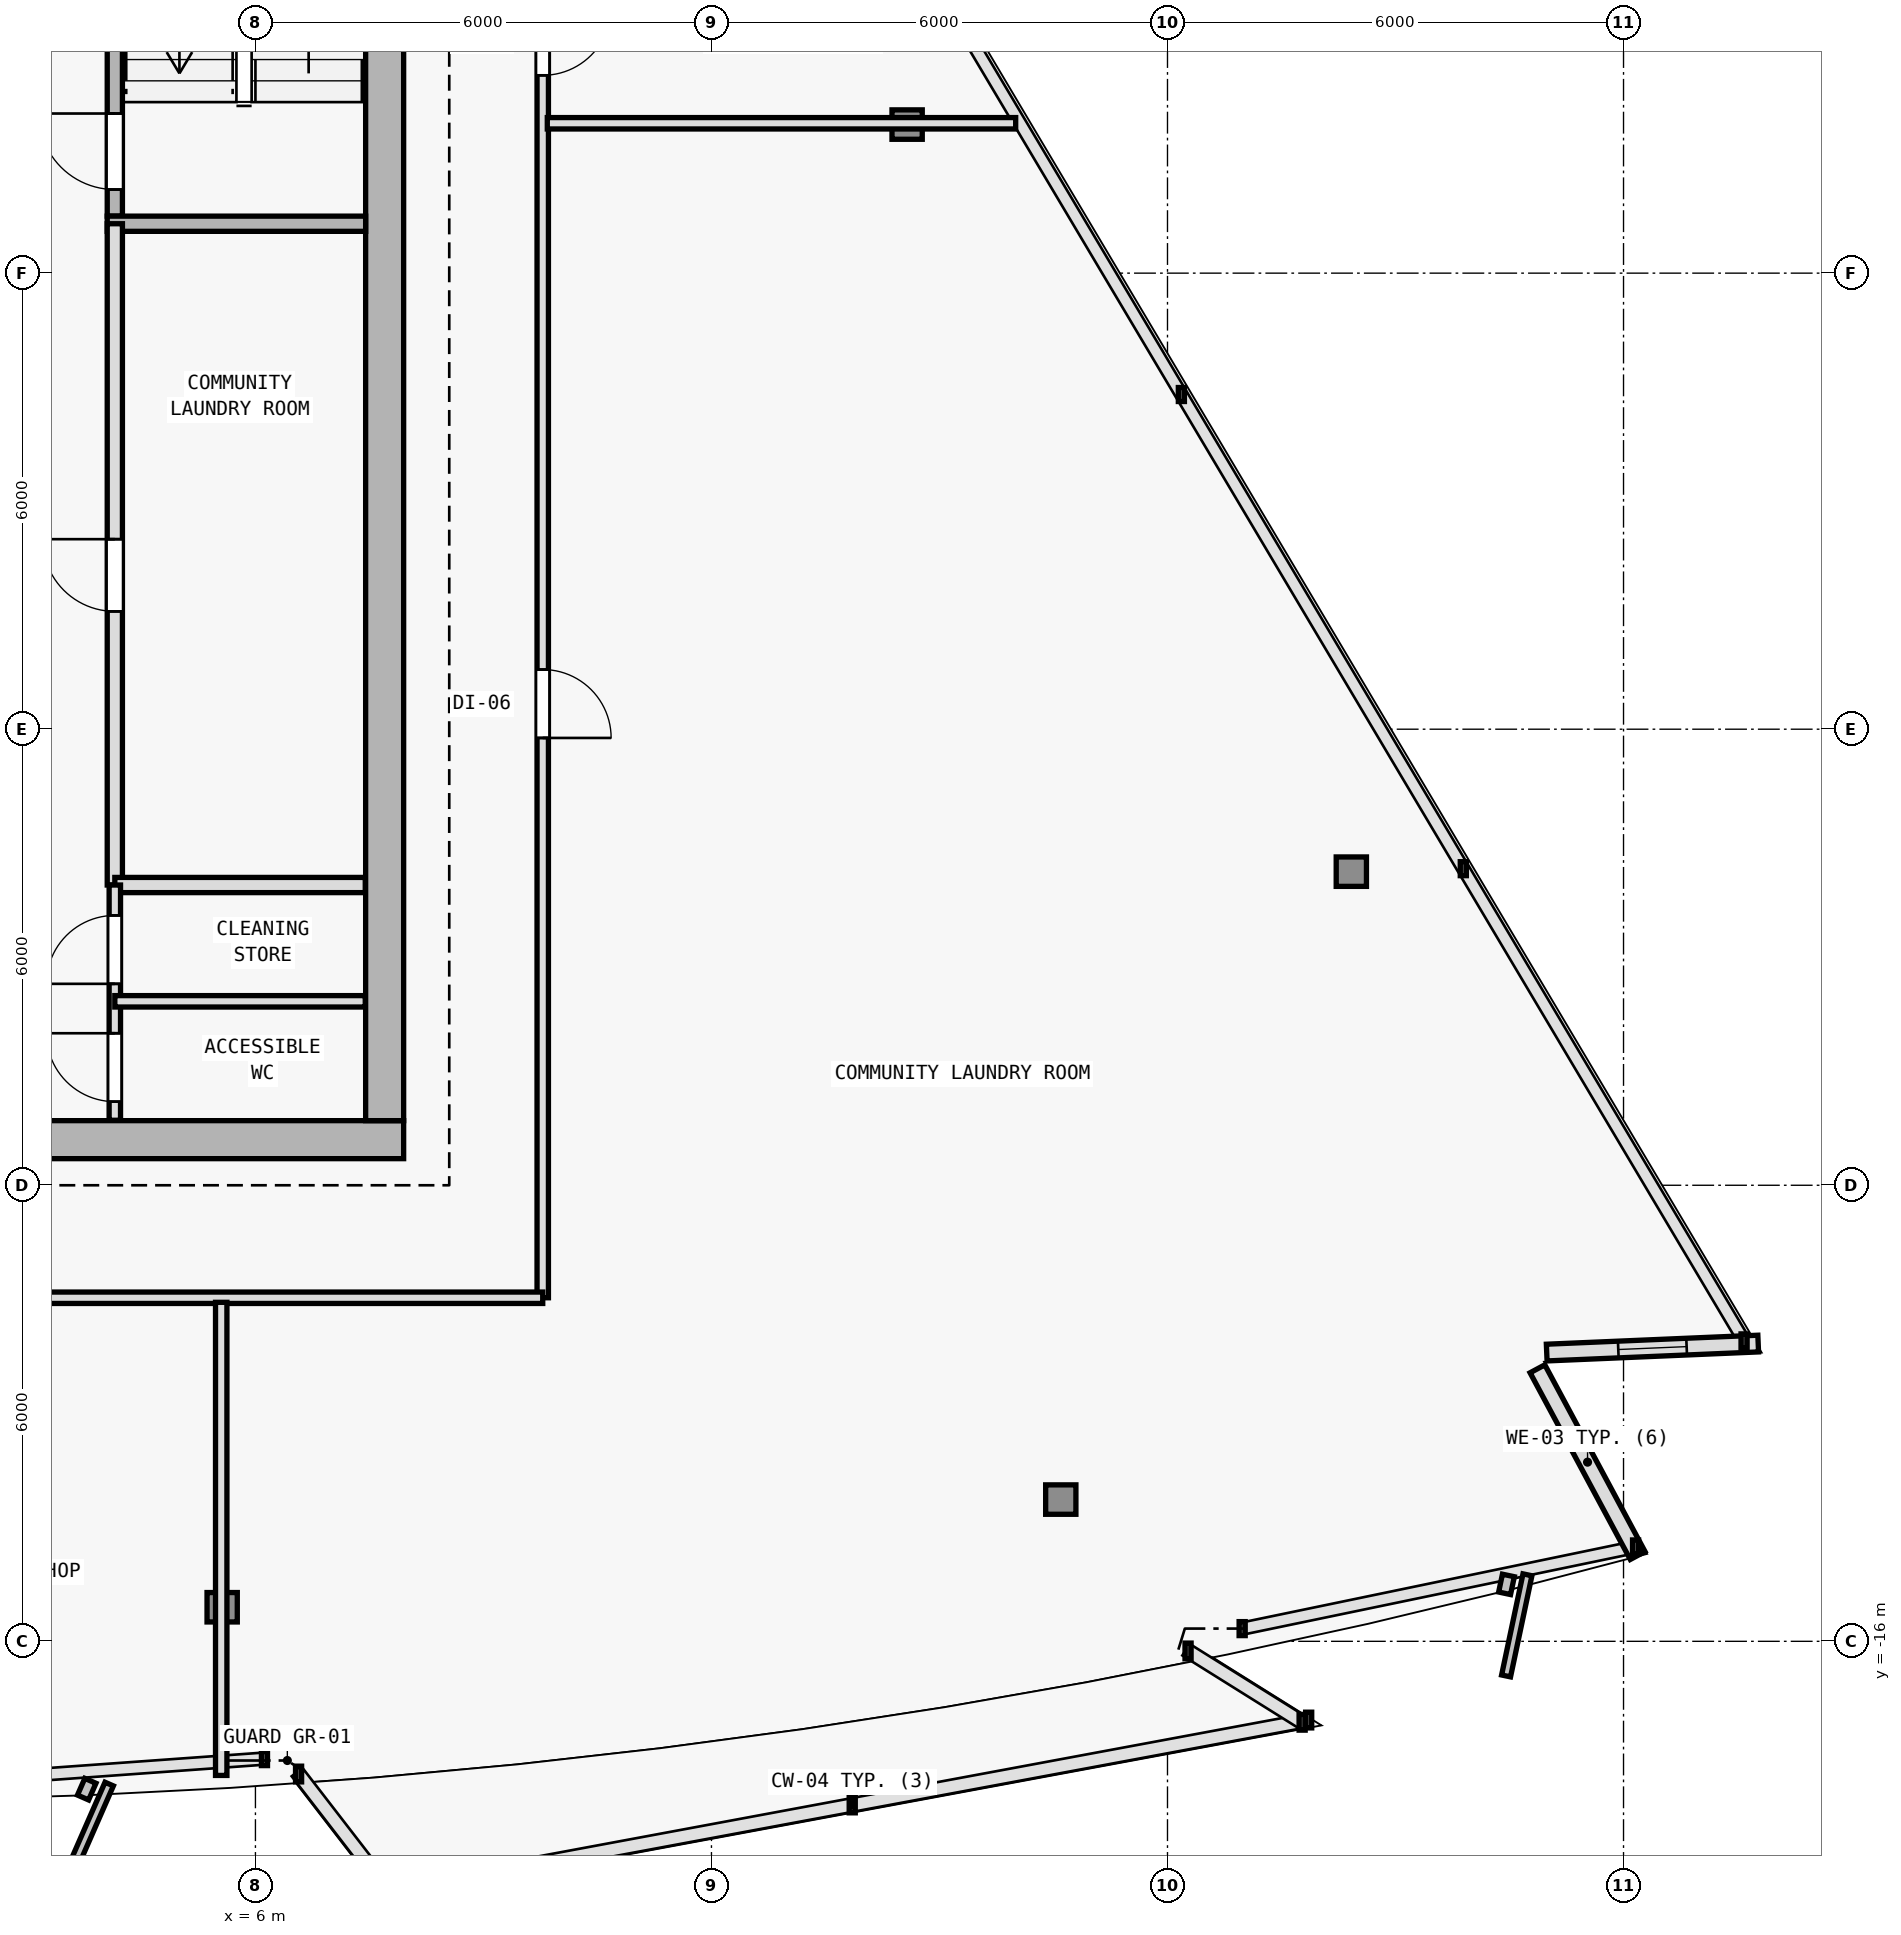
"""IFC4 building model, lengths in metres.
Left out: names, types, materials, properties, quantities, classifications, styles, units other than length and angle.
Written with IfcOpenShell. Run it as: python <this file> out.ifc"""

import sys

from ifc_helpers import new_model, si_unit, direction, frame, frame_2d, origin, origin_2d, place, context, subcontext, project, spatial, rectangle, i_section, extrude, element, fill, save


model = new_model("IFC4")
c1 = context("Model", 3, precision=1e-05, world=origin(), true_north=direction((0.0, 1.0)))
c2 = subcontext(c1, "Body", "Model", "MODEL_VIEW")
j1 = project(units=[si_unit("LENGTHUNIT", "METRE"), si_unit("PLANEANGLEUNIT", "RADIAN")], contexts=[c1])
p1 = place(None, origin())
s1 = spatial("IfcSite", under=j1, at=p1, CompositionType="ELEMENT")
p2 = place(p1, origin())
s2 = spatial("IfcBuilding", under=s1, at=p2, CompositionType="ELEMENT")
p3 = place(p2, frame((0.0, 0.0, 216.3)))
s3 = spatial("IfcBuildingStorey", under=s2, at=p3, CompositionType="ELEMENT", Elevation=216.3)
for number, where, z_axis, x_axis in (
    (1, (7.7, -9.4, 0.0), (0.0, 0.0, 1.0), (1.0, 0.0, 0.0)),
    (2, (7.7, 0.4, 0.0), (0.0, 0.0, 1.0), (1.0, 0.0, 0.0)),
):
    element("IfcColumn", number, at=place(p3, frame(where, z_axis=z_axis, x_axis=x_axis)), inside=s3, PredefinedType="COLUMN", context=c2, shape_type="SweptSolid", body=[
        extrude(i_section(OverallWidth=0.398, OverallDepth=0.387, WebThickness=0.013, FlangeThickness=0.022, FilletRadius=0.015, at=origin_2d()), origin(), (0.0, 0.0, 1.0), 3.6),
    ])
p4 = place(p3, frame((5.562, -15.552, 0.005), z_axis=(-0.00693381708, 0.03528089279, 0.999353381334), x_axis=(-0.981229659911, -0.192842823335, 0.0)))
e3 = element("IfcColumn", 3, at=p4, inside=s3, PredefinedType="COLUMN", context=c2, shape_type="SweptSolid", body=[
    extrude(i_section(OverallWidth=0.398, OverallDepth=0.387, WebThickness=0.013, FlangeThickness=0.022, FilletRadius=0.015, at=origin_2d()), origin(), (0.0, 0.0, 1.0), 3.592),
])
p5 = place(p3, frame((16.596, -14.135, 0.005), z_axis=(-0.020594893987, 0.033509183946, 0.999226193078), x_axis=(-0.851954850327, -0.523615252838, 0.0)))
e4 = element("IfcColumn", 4, at=p5, inside=s3, PredefinedType="COLUMN", context=c2, shape_type="SweptSolid", body=[
    extrude(i_section(OverallWidth=0.398, OverallDepth=0.387, WebThickness=0.013, FlangeThickness=0.022, FilletRadius=0.015, at=origin_2d()), origin(), (0.0, 0.0, 1.0), 3.592),
])
p6 = place(p3, frame((20.419, -5.874, 0.005), z_axis=(-0.026105663043, 0.021618752208, 0.999425396871), x_axis=(-0.637813971185, -0.770190455771, 0.0)))
e5 = element("IfcColumn", 5, at=p6, inside=s3, PredefinedType="COLUMN", context=c2, shape_type="SweptSolid", body=[
    extrude(i_section(OverallWidth=0.398, OverallDepth=0.387, WebThickness=0.013, FlangeThickness=0.022, FilletRadius=0.015, at=origin_2d()), origin(), (0.0, 0.0, 1.0), 3.591),
])
p7 = place(p3, frame((14.574, 3.955, 0.005), z_axis=(-0.018906041, 0.009521027842, 0.999775930718), x_axis=(-0.449781931574, -0.893138406984, 0.0)))
e6 = element("IfcColumn", 6, at=p7, inside=s3, PredefinedType="COLUMN", context=c2, shape_type="SweptSolid", body=[
    extrude(i_section(OverallWidth=0.398, OverallDepth=0.387, WebThickness=0.013, FlangeThickness=0.022, FilletRadius=0.015, at=origin_2d()), origin(), (0.0, 0.0, 1.0), 3.59),
])
p8 = place(p3, frame((22.868, -12.415, 0.0), z_axis=(0.0, 0.0, 1.0), x_axis=(0.472845900162, -0.881145138272, 0.0)))
e7 = element("IfcWall", 7, at=p8, inside=s3, PredefinedType="SOLIDWALL", context=c2, shape_type="SweptSolid", body=[
    extrude(rectangle(XDim=2.788, YDim=0.22, at=frame_2d((1.394, 0.0))), origin(), (0.0, 0.0, 1.0), 3.35),
])
p9 = place(p3, frame((25.772, -12.083, 0.0), z_axis=(0.0, 0.0, 1.0), x_axis=(-0.999095761456, -0.042516578425, 0.0)))
e8 = element("IfcWall", 8, at=p9, inside=s3, PredefinedType="SOLIDWALL", context=c2, shape_type="SweptSolid", body=[
    extrude(rectangle(XDim=2.785, YDim=0.22, at=frame_2d((1.393, 0.0))), origin(), (0.0, 0.0, 1.0), 3.35),
])
p10 = place(p9, frame((0.942, 0.0, 0.62)))
e9 = element("IfcOpeningElement", 9, at=p10, cuts=e8, PredefinedType="OPENING", context=c2, shape_type="SweptSolid", body=[
    extrude(rectangle(XDim=0.9, YDim=1.6, at=frame_2d((0.45, 0.8))), frame((0.0, 0.12, 0.0), z_axis=(0.0, -1.0, 0.0), x_axis=(1.0, 0.0, 0.0)), (0.0, 0.0, 1.0), 0.24),
])
p11 = place(p3, frame((-7.95, -9.4, 0.0), z_axis=(0.0, 0.0, 1.0), x_axis=(1.0, 0.0, 0.0)))
e10 = element("IfcWall", 10, at=p11, inside=s3, PredefinedType="SHEAR", context=c2, shape_type="SweptSolid", body=[
    extrude(rectangle(XDim=15.9, YDim=0.5, at=frame_2d((7.95, 0.0))), origin(), (0.0, 0.0, 1.0), 3.35),
])
p12 = place(p11, frame((9.6, 0.0, 0.0)))
e11 = element("IfcOpeningElement", 11, at=p12, cuts=e10, PredefinedType="OPENING", context=c2, shape_type="SweptSolid", body=[
    extrude(rectangle(XDim=1.5, YDim=2.2, at=frame_2d((0.75, 1.1))), frame((0.0, 0.26, 0.0), z_axis=(0.0, -1.0, 0.0), x_axis=(1.0, 0.0, 0.0)), (0.0, 0.0, 1.0), 0.52),
])
p13 = place(p3, frame((7.7, 9.95, 0.0), z_axis=(0.0, 0.0, 1.0), x_axis=(0.0, -1.0, 0.0)))
e12 = element("IfcWall", 12, at=p13, inside=s3, PredefinedType="SHEAR", context=c2, shape_type="SweptSolid", body=[
    extrude(rectangle(XDim=19.1, YDim=0.5, at=frame_2d((9.55, 0.0))), origin(), (0.0, 0.0, 1.0), 3.35),
])
p14 = place(p3, frame((4.15, 2.75, 0.0), z_axis=(0.0, 0.0, 1.0), x_axis=(0.0, 1.0, 0.0)))
e13 = element("IfcWall", 13, at=p14, inside=s3, PredefinedType="SOLIDWALL", context=c2, shape_type="SweptSolid", body=[
    extrude(rectangle(XDim=7.2, YDim=0.2, at=frame_2d((3.6, 0.0))), origin(), (0.0, 0.0, 1.0), 3.35),
])
p15 = place(p14, frame((0.35, 0.0, 0.0)))
e14 = element("IfcOpeningElement", 14, at=p15, cuts=e13, PredefinedType="OPENING", context=c2, shape_type="SweptSolid", body=[
    extrude(rectangle(XDim=1.0, YDim=2.15, at=frame_2d((0.5, 1.075))), frame((0.0, 0.11, 0.0), z_axis=(0.0, -1.0, 0.0), x_axis=(1.0, 0.0, 0.0)), (0.0, 0.0, 1.0), 0.22),
])
p16 = place(p3, frame((4.05, 2.65, 0.0), z_axis=(0.0, 0.0, 1.0), x_axis=(1.0, 0.0, 0.0)))
e15 = element("IfcWall", 15, at=p16, inside=s3, PredefinedType="SOLIDWALL", context=c2, shape_type="SweptSolid", body=[
    extrude(rectangle(XDim=3.4, YDim=0.2, at=frame_2d((1.7, 0.0))), origin(), (0.0, 0.0, 1.0), 3.35),
])
p17 = place(p3, frame((4.15, -6.05, 0.0), z_axis=(0.0, 0.0, 1.0), x_axis=(0.0, 1.0, 0.0)))
e16 = element("IfcWall", 16, at=p17, inside=s3, PredefinedType="SOLIDWALL", context=c2, shape_type="SweptSolid", body=[
    extrude(rectangle(XDim=8.7, YDim=0.2, at=frame_2d((4.35, 0.0))), origin(), (0.0, 0.0, 1.0), 3.35),
])
p18 = place(p17, frame((3.6, 0.0, 0.0)))
e17 = element("IfcOpeningElement", 17, at=p18, cuts=e16, PredefinedType="OPENING", context=c2, shape_type="SweptSolid", body=[
    extrude(rectangle(XDim=0.95, YDim=2.1, at=frame_2d((0.475, 1.05))), frame((0.0, 0.11, 0.0), z_axis=(0.0, -1.0, 0.0), x_axis=(1.0, 0.0, 0.0)), (0.0, 0.0, 1.0), 0.22),
])
p19 = place(p3, frame((4.15, -6.05, 0.0), z_axis=(0.0, 0.0, 1.0), x_axis=(1.0, 0.0, 0.0)))
e18 = element("IfcWall", 18, at=p19, inside=s3, PredefinedType="SOLIDWALL", context=c2, shape_type="SweptSolid", body=[
    extrude(rectangle(XDim=3.295, YDim=0.2, at=frame_2d((1.647, 0.0))), origin(), (0.0, 0.0, 1.0), 3.35),
])
p20 = place(p3, frame((4.15, -9.145, 0.0), z_axis=(0.0, 0.0, 1.0), x_axis=(0.0, 1.0, 0.0)))
e19 = element("IfcWall", 19, at=p20, inside=s3, PredefinedType="PARTITIONING", context=c2, shape_type="SweptSolid", body=[
    extrude(rectangle(XDim=3.095, YDim=0.15, at=frame_2d((1.547, 0.0))), origin(), (0.0, 0.0, 1.0), 3.35),
])
p21 = place(p20, frame((0.245, 0.0, 0.0)))
e20 = element("IfcOpeningElement", 20, at=p21, cuts=e19, PredefinedType="OPENING", context=c2, shape_type="SweptSolid", body=[
    extrude(rectangle(XDim=0.9, YDim=2.1, at=frame_2d((0.45, 1.05))), frame((0.0, 0.085, 0.0), z_axis=(0.0, -1.0, 0.0), x_axis=(1.0, 0.0, 0.0)), (0.0, 0.0, 1.0), 0.17),
])
p22 = place(p20, frame((1.795, 0.0, 0.0)))
e21 = element("IfcOpeningElement", 21, at=p22, cuts=e19, PredefinedType="OPENING", context=c2, shape_type="SweptSolid", body=[
    extrude(rectangle(XDim=0.9, YDim=2.1, at=frame_2d((0.45, 1.05))), frame((0.0, 0.085, 0.0), z_axis=(0.0, -1.0, 0.0), x_axis=(1.0, 0.0, 0.0)), (0.0, 0.0, 1.0), 0.17),
])
p23 = place(p3, frame((4.15, -7.58, 0.0), z_axis=(0.0, 0.0, 1.0), x_axis=(1.0, 0.0, 0.0)))
e22 = element("IfcWall", 22, at=p23, inside=s3, PredefinedType="PARTITIONING", context=c2, shape_type="SweptSolid", body=[
    extrude(rectangle(XDim=3.295, YDim=0.15, at=frame_2d((1.647, 0.0))), origin(), (0.0, 0.0, 1.0), 3.35),
])
p24 = place(p3, frame((9.78, 8.226, 0.0), z_axis=(0.0, 0.0, 1.0), x_axis=(0.0, -1.0, 0.0)))
e23 = element("IfcWall", 23, at=p24, inside=s3, PredefinedType="PARTITIONING", context=c2, shape_type="SweptSolid", body=[
    extrude(rectangle(XDim=19.706, YDim=0.15, at=frame_2d((9.853, 0.0))), origin(), (0.0, 0.0, 1.0), 2.775),
])
p25 = place(p24, frame((11.441, 0.0, 0.0)))
e24 = element("IfcOpeningElement", 24, at=p25, cuts=e23, PredefinedType="OPENING", context=c2, shape_type="SweptSolid", body=[
    extrude(rectangle(XDim=0.9, YDim=2.1, at=frame_2d((0.45, 1.05))), frame((0.0, 0.085, 0.0), z_axis=(0.0, -1.0, 0.0), x_axis=(1.0, 0.0, 0.0)), (0.0, 0.0, 1.0), 0.17),
])
p26 = place(p24, frame((2.723, 0.0, 0.0)))
e25 = element("IfcOpeningElement", 25, at=p26, cuts=e23, PredefinedType="OPENING", context=c2, shape_type="SweptSolid", body=[
    extrude(rectangle(XDim=0.9, YDim=2.1, at=frame_2d((0.45, 1.05))), frame((0.0, 0.085, 0.0), z_axis=(0.0, -1.0, 0.0), x_axis=(1.0, 0.0, 0.0)), (0.0, 0.0, 1.0), 0.17),
])
p27 = place(p24, frame((0.685, 0.0, 0.0)))
e26 = element("IfcOpeningElement", 26, at=p27, cuts=e23, PredefinedType="OPENING", context=c2, shape_type="SweptSolid", body=[
    extrude(rectangle(XDim=0.9, YDim=2.1, at=frame_2d((0.45, 1.05))), frame((0.0, 0.085, 0.0), z_axis=(0.0, -1.0, 0.0), x_axis=(1.0, 0.0, 0.0)), (0.0, 0.0, 1.0), 0.17),
])
p28 = place(p3, frame((9.78, -11.48, 0.0), z_axis=(0.0, 0.0, 1.0), x_axis=(-1.0, 0.0, 0.0)))
e27 = element("IfcWall", 27, at=p28, inside=s3, PredefinedType="PARTITIONING", context=c2, shape_type="SweptSolid", body=[
    extrude(rectangle(XDim=19.56, YDim=0.15, at=frame_2d((9.78, 0.0))), origin(), (0.0, 0.0, 1.0), 2.965),
])
p29 = place(p28, frame((12.202, 0.0, 0.0)))
e28 = element("IfcOpeningElement", 28, at=p29, cuts=e27, PredefinedType="OPENING", context=c2, shape_type="SweptSolid", body=[
    extrude(rectangle(XDim=0.9, YDim=2.1, at=frame_2d((0.45, 1.05))), frame((0.0, 0.085, 0.0), z_axis=(0.0, -1.0, 0.0), x_axis=(1.0, 0.0, 0.0)), (0.0, 0.0, 1.0), 0.17),
])
p30 = place(p28, frame((6.653, 0.0, 0.0)))
e29 = element("IfcOpeningElement", 29, at=p30, cuts=e27, PredefinedType="OPENING", context=c2, shape_type="SweptSolid", body=[
    extrude(rectangle(XDim=0.9, YDim=2.1, at=frame_2d((0.45, 1.05))), frame((0.0, 0.085, 0.0), z_axis=(0.0, -1.0, 0.0), x_axis=(1.0, 0.0, 0.0)), (0.0, 0.0, 1.0), 0.17),
])
p31 = place(p3, frame((5.55, -11.54, 0.0), z_axis=(0.0, 0.0, 1.0), x_axis=(0.0, -1.0, 0.0)))
e30 = element("IfcWall", 30, at=p31, inside=s3, PredefinedType="PARTITIONING", context=c2, shape_type="SweptSolid", body=[
    extrude(rectangle(XDim=6.224, YDim=0.15, at=frame_2d((3.112, 0.0))), origin(), (0.0, 0.0, 1.0), 2.775),
])
p32 = place(p3, frame((9.84, 3.972, 0.0), z_axis=(0.0, 0.0, 1.0), x_axis=(1.0, 0.0, 0.0)))
e31 = element("IfcWall", 31, at=p32, inside=s3, PredefinedType="PARTITIONING", context=c2, shape_type="SweptSolid", body=[
    extrude(rectangle(XDim=6.163, YDim=0.15, at=frame_2d((3.081, 0.0))), origin(), (0.0, 0.0, 1.0), 2.775),
])
p33 = place(p10, origin())
e32 = element("IfcWindow", 32, at=p33, inside=s3, PartitioningType="SINGLE_PANEL", PredefinedType="WINDOW", context=c2, shape_type="SweptSolid", body=[
    extrude(rectangle(XDim=0.9, YDim=1.6, at=frame_2d((0.45, 0.8))), frame((0.0, 0.03, 0.0), z_axis=(0.0, -1.0, 0.0), x_axis=(1.0, 0.0, 0.0)), (0.0, 0.0, 1.0), 0.06),
])
fill(e9, e32)
p34 = place(p15, origin())
e33 = element("IfcDoor", 33, at=p34, inside=s3, OperationType="SINGLE_SWING_RIGHT", PredefinedType="DOOR", context=c2, shape_type="SweptSolid", body=[
    extrude(rectangle(XDim=1.0, YDim=2.15, at=frame_2d((0.5, 1.075))), frame((0.0, 0.025, 0.0), z_axis=(0.0, -1.0, 0.0), x_axis=(1.0, 0.0, 0.0)), (0.0, 0.0, 1.0), 0.05),
])
fill(e14, e33)
p35 = place(p18, origin())
e34 = element("IfcDoor", 34, at=p35, inside=s3, OperationType="SINGLE_SWING_RIGHT", PredefinedType="DOOR", context=c2, shape_type="SweptSolid", body=[
    extrude(rectangle(XDim=0.95, YDim=2.1, at=frame_2d((0.475, 1.05))), frame((0.0, 0.025, 0.0), z_axis=(0.0, -1.0, 0.0), x_axis=(1.0, 0.0, 0.0)), (0.0, 0.0, 1.0), 0.05),
])
fill(e17, e34)
p36 = place(p21, origin())
e35 = element("IfcDoor", 35, at=p36, inside=s3, OperationType="SINGLE_SWING_RIGHT", PredefinedType="DOOR", context=c2, shape_type="SweptSolid", body=[
    extrude(rectangle(XDim=0.9, YDim=2.1, at=frame_2d((0.45, 1.05))), frame((0.0, 0.025, 0.0), z_axis=(0.0, -1.0, 0.0), x_axis=(1.0, 0.0, 0.0)), (0.0, 0.0, 1.0), 0.05),
])
fill(e20, e35)
p37 = place(p22, origin())
e36 = element("IfcDoor", 36, at=p37, inside=s3, OperationType="SINGLE_SWING_LEFT", PredefinedType="DOOR", context=c2, shape_type="SweptSolid", body=[
    extrude(rectangle(XDim=0.9, YDim=2.1, at=frame_2d((0.45, 1.05))), frame((0.0, 0.025, 0.0), z_axis=(0.0, -1.0, 0.0), x_axis=(1.0, 0.0, 0.0)), (0.0, 0.0, 1.0), 0.05),
])
fill(e21, e36)
p38 = place(p25, origin())
e37 = element("IfcDoor", 37, at=p38, inside=s3, OperationType="SINGLE_SWING_RIGHT", PredefinedType="DOOR", context=c2, shape_type="SweptSolid", body=[
    extrude(rectangle(XDim=0.9, YDim=2.1, at=frame_2d((0.45, 1.05))), frame((0.0, 0.025, 0.0), z_axis=(0.0, -1.0, 0.0), x_axis=(1.0, 0.0, 0.0)), (0.0, 0.0, 1.0), 0.05),
])
fill(e24, e37)
p39 = place(p26, origin())
e38 = element("IfcDoor", 38, at=p39, inside=s3, OperationType="SINGLE_SWING_LEFT", PredefinedType="DOOR", context=c2, shape_type="SweptSolid", body=[
    extrude(rectangle(XDim=0.9, YDim=2.1, at=frame_2d((0.45, 1.05))), frame((0.0, 0.025, 0.0), z_axis=(0.0, -1.0, 0.0), x_axis=(1.0, 0.0, 0.0)), (0.0, 0.0, 1.0), 0.05),
])
fill(e25, e38)
save(model, sys.argv[1])
